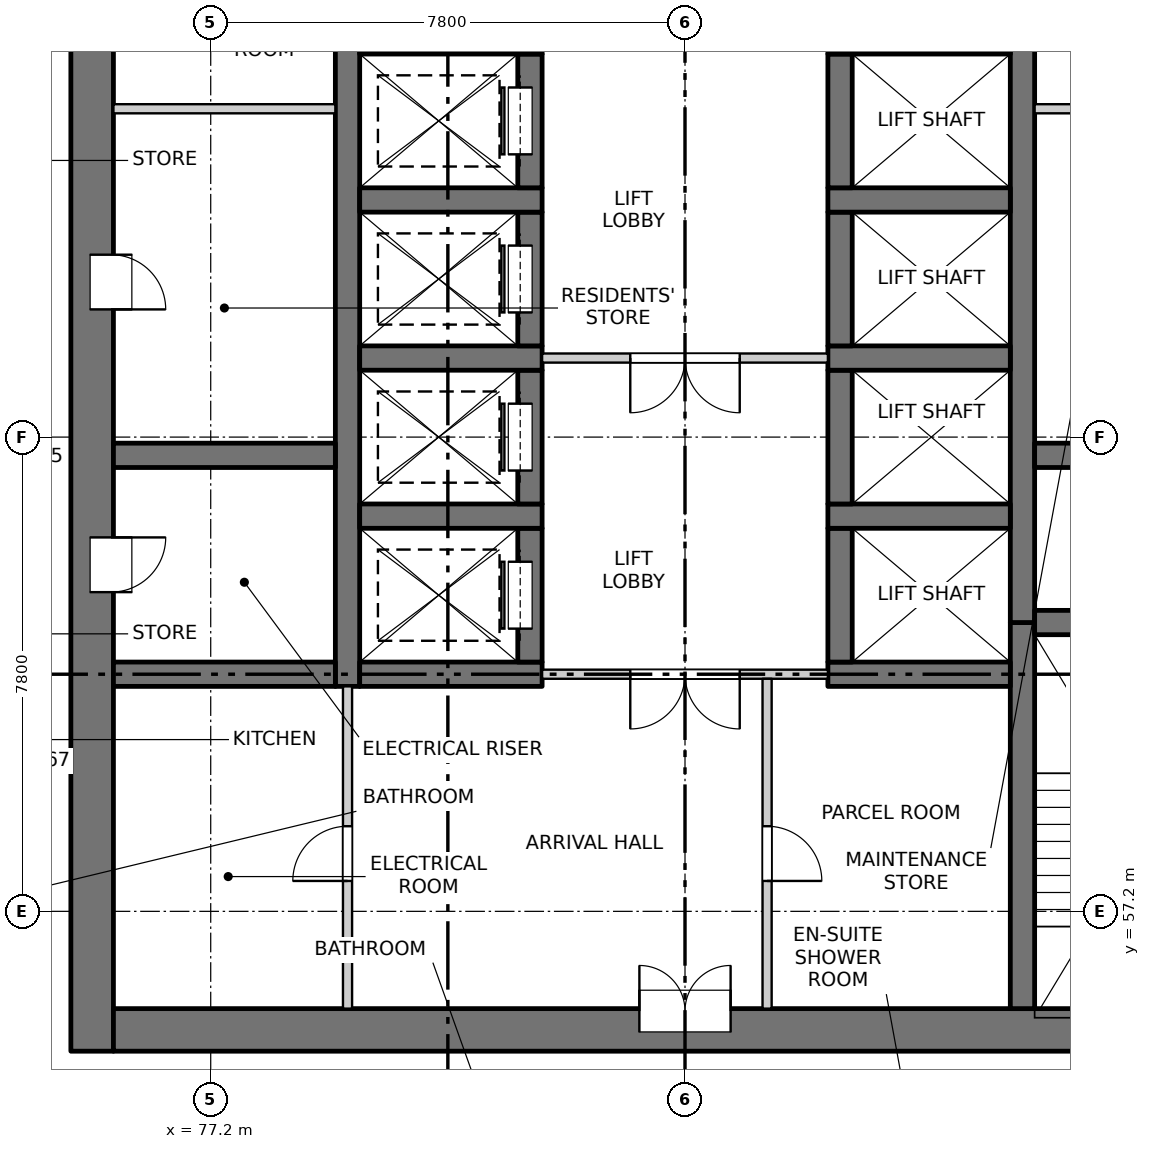
"""IFC4 building model, lengths in metres.
Left out: names, types, materials, properties, quantities, classifications, styles, units other than length and angle.
Written with IfcOpenShell. Run it as: python <this file> out.ifc"""

import sys

from ifc_helpers import new_model, si_unit, direction, frame, frame_2d, origin, place, context, subcontext, project, spatial, rectangle, extrude, element, fill, save


model = new_model("IFC4")
c1 = context("Model", 3, precision=1e-05, world=origin(), true_north=direction((0.0, 1.0)))
c2 = subcontext(c1, "Body", "Model", "MODEL_VIEW")
j1 = project(units=[si_unit("LENGTHUNIT", "METRE"), si_unit("PLANEANGLEUNIT", "RADIAN")], contexts=[c1])
p1 = place(None, origin())
s1 = spatial("IfcSite", under=j1, at=p1, CompositionType="ELEMENT")
p2 = place(p1, origin())
s2 = spatial("IfcBuilding", under=s1, at=p2, CompositionType="ELEMENT")
p3 = place(p2, frame((0.0, 0.0, 39.9)))
s3 = spatial("IfcBuildingStorey", under=s2, at=p3, CompositionType="ELEMENT", Elevation=39.9)
p4 = place(p3, frame((75.25, 54.9, -0.25), z_axis=(0.0, 0.0, 1.0), x_axis=(0.0, 1.0, 0.0)))
e1 = element("IfcWall", 1, at=p4, inside=s3, PredefinedType="SOLIDWALL", context=c2, shape_type="SweptSolid", body=[
    extrude(rectangle(XDim=22.4, YDim=0.7, at=frame_2d((11.2, 0.0))), origin(), (0.0, 0.0, 1.0), 3.4),
])
p5 = place(p4, frame((7.55, 0.0, 0.25)))
e2 = element("IfcOpeningElement", 2, at=p5, cuts=e1, PredefinedType="OPENING", context=c2, shape_type="SweptSolid", body=[
    extrude(rectangle(XDim=0.9, YDim=2.1, at=frame_2d((0.45, 1.05))), frame((0.0, 0.36, 0.0), z_axis=(0.0, -1.0, 0.0), x_axis=(1.0, 0.0, 0.0)), (0.0, 0.0, 1.0), 0.72),
])
p6 = place(p4, frame((12.2, 0.0, 0.25)))
e3 = element("IfcOpeningElement", 3, at=p6, cuts=e1, PredefinedType="OPENING", context=c2, shape_type="SweptSolid", body=[
    extrude(rectangle(XDim=0.9, YDim=2.1, at=frame_2d((0.45, 1.05))), frame((0.0, 0.36, 0.0), z_axis=(0.0, -1.0, 0.0), x_axis=(1.0, 0.0, 0.0)), (0.0, 0.0, 1.0), 0.72),
])
p7 = place(p4, frame((16.7, 0.0, 0.25)))
e4 = element("IfcOpeningElement", 4, at=p7, cuts=e1, PredefinedType="OPENING", context=c2, shape_type="SweptSolid", body=[
    extrude(rectangle(XDim=0.9, YDim=2.1, at=frame_2d((0.45, 1.05))), frame((0.0, 0.36, 0.0), z_axis=(0.0, -1.0, 0.0), x_axis=(1.0, 0.0, 0.0)), (0.0, 0.0, 1.0), 0.72),
])
p8 = place(p4, frame((20.15, 0.0, 0.25)))
e5 = element("IfcOpeningElement", 5, at=p8, cuts=e1, PredefinedType="OPENING", context=c2, shape_type="SweptSolid", body=[
    extrude(rectangle(XDim=0.9, YDim=2.1, at=frame_2d((0.45, 1.05))), frame((0.0, 0.36, 0.0), z_axis=(0.0, -1.0, 0.0), x_axis=(1.0, 0.0, 0.0)), (0.0, 0.0, 1.0), 0.72),
])
p9 = place(p3, frame((75.6, 55.25, -0.25), z_axis=(0.0, 0.0, 1.0), x_axis=(1.0, 0.0, 0.0)))
e6 = element("IfcWall", 6, at=p9, inside=s3, PredefinedType="SOLIDWALL", context=c2, shape_type="SweptSolid", body=[
    extrude(rectangle(XDim=18.8, YDim=0.7, at=frame_2d((9.4, 0.0))), origin(), (0.0, 0.0, 1.0), 3.4),
])
p10 = place(p9, frame((8.65, 0.0, 0.25)))
e7 = element("IfcOpeningElement", 7, at=p10, cuts=e6, PredefinedType="OPENING", context=c2, shape_type="SweptSolid", body=[
    extrude(rectangle(XDim=1.5, YDim=2.1, at=frame_2d((0.75, 1.05))), frame((0.0, 0.36, 0.0), z_axis=(0.0, -1.0, 0.0), x_axis=(1.0, 0.0, 0.0)), (0.0, 0.0, 1.0), 0.72),
])
p11 = place(p3, frame((79.45, 60.9, -0.25), z_axis=(0.0, 0.0, 1.0), x_axis=(0.0, 1.0, 0.0)))
e8 = element("IfcWall", 8, at=p11, inside=s3, PredefinedType="SOLIDWALL", context=c2, shape_type="SweptSolid", body=[
    extrude(rectangle(XDim=16.4, YDim=0.4, at=frame_2d((8.2, 0.0))), origin(), (0.0, 0.0, 1.0), 3.4),
])
p12 = place(p3, frame((90.55, 55.6, -0.25), z_axis=(0.0, 0.0, 1.0), x_axis=(0.0, 1.0, 0.0)))
e9 = element("IfcWall", 9, at=p12, inside=s3, PredefinedType="SOLIDWALL", context=c2, shape_type="SweptSolid", body=[
    extrude(rectangle(XDim=6.35, YDim=0.4, at=frame_2d((3.175, 0.0))), origin(), (0.0, 0.0, 1.0), 3.4),
])
p13 = place(p3, frame((90.55, 61.95, -0.25), z_axis=(0.0, 0.0, 1.0), x_axis=(0.0, 1.0, 0.0)))
e10 = element("IfcWall", 10, at=p13, inside=s3, PredefinedType="SOLIDWALL", context=c2, shape_type="SweptSolid", body=[
    extrude(rectangle(XDim=15.35, YDim=0.4, at=frame_2d((7.675, 0.0))), origin(), (0.0, 0.0, 1.0), 3.4),
])
p14 = place(p3, frame((79.65, 61.1, -0.25), z_axis=(0.0, 0.0, 1.0), x_axis=(1.0, 0.0, 0.0)))
e11 = element("IfcWall", 11, at=p14, inside=s3, PredefinedType="SOLIDWALL", context=c2, shape_type="SweptSolid", body=[
    extrude(rectangle(XDim=3.0, YDim=0.4, at=frame_2d((1.5, 0.0))), origin(), (0.0, 0.0, 1.0), 3.4),
])
p15 = place(p3, frame((82.45, 61.3, -0.25), z_axis=(0.0, 0.0, 1.0), x_axis=(0.0, 1.0, 0.0)))
e12 = element("IfcWall", 12, at=p15, inside=s3, PredefinedType="SOLIDWALL", context=c2, shape_type="SweptSolid", body=[
    extrude(rectangle(XDim=2.2, YDim=0.4, at=frame_2d((1.1, 0.0))), origin(), (0.0, 0.0, 1.0), 3.4),
])
p16 = place(p15, frame((0.55, 0.0, 0.25)))
e13 = element("IfcOpeningElement", 13, at=p16, cuts=e12, PredefinedType="OPENING", context=c2, shape_type="SweptSolid", body=[
    extrude(rectangle(XDim=1.1, YDim=2.1, at=frame_2d((0.55, 1.05))), frame((0.0, 0.21, 0.0), z_axis=(0.0, -1.0, 0.0), x_axis=(1.0, 0.0, 0.0)), (0.0, 0.0, 1.0), 0.42),
])
p17 = place(p3, frame((79.65, 63.7, -0.25), z_axis=(0.0, 0.0, 1.0), x_axis=(1.0, 0.0, 0.0)))
e14 = element("IfcWall", 14, at=p17, inside=s3, PredefinedType="SOLIDWALL", context=c2, shape_type="SweptSolid", body=[
    extrude(rectangle(XDim=3.0, YDim=0.4, at=frame_2d((1.5, 0.0))), origin(), (0.0, 0.0, 1.0), 3.4),
])
p18 = place(p3, frame((82.45, 63.9, -0.25), z_axis=(0.0, 0.0, 1.0), x_axis=(0.0, 1.0, 0.0)))
e15 = element("IfcWall", 15, at=p18, inside=s3, PredefinedType="SOLIDWALL", context=c2, shape_type="SweptSolid", body=[
    extrude(rectangle(XDim=2.2, YDim=0.4, at=frame_2d((1.1, 0.0))), origin(), (0.0, 0.0, 1.0), 3.4),
])
p19 = place(p18, frame((0.55, 0.0, 0.25)))
e16 = element("IfcOpeningElement", 16, at=p19, cuts=e15, PredefinedType="OPENING", context=c2, shape_type="SweptSolid", body=[
    extrude(rectangle(XDim=1.1, YDim=2.1, at=frame_2d((0.55, 1.05))), frame((0.0, 0.21, 0.0), z_axis=(0.0, -1.0, 0.0), x_axis=(1.0, 0.0, 0.0)), (0.0, 0.0, 1.0), 0.42),
])
p20 = place(p3, frame((79.65, 66.3, -0.25), z_axis=(0.0, 0.0, 1.0), x_axis=(1.0, 0.0, 0.0)))
e17 = element("IfcWall", 17, at=p20, inside=s3, PredefinedType="SOLIDWALL", context=c2, shape_type="SweptSolid", body=[
    extrude(rectangle(XDim=3.0, YDim=0.4, at=frame_2d((1.5, 0.0))), origin(), (0.0, 0.0, 1.0), 3.4),
])
p21 = place(p3, frame((82.45, 66.5, -0.25), z_axis=(0.0, 0.0, 1.0), x_axis=(0.0, 1.0, 0.0)))
e18 = element("IfcWall", 18, at=p21, inside=s3, PredefinedType="SOLIDWALL", context=c2, shape_type="SweptSolid", body=[
    extrude(rectangle(XDim=2.2, YDim=0.4, at=frame_2d((1.1, 0.0))), origin(), (0.0, 0.0, 1.0), 3.4),
])
p22 = place(p21, frame((0.55, 0.0, 0.25)))
e19 = element("IfcOpeningElement", 19, at=p22, cuts=e18, PredefinedType="OPENING", context=c2, shape_type="SweptSolid", body=[
    extrude(rectangle(XDim=1.1, YDim=2.1, at=frame_2d((0.55, 1.05))), frame((0.0, 0.21, 0.0), z_axis=(0.0, -1.0, 0.0), x_axis=(1.0, 0.0, 0.0)), (0.0, 0.0, 1.0), 0.42),
])
p23 = place(p3, frame((79.65, 68.9, -0.25), z_axis=(0.0, 0.0, 1.0), x_axis=(1.0, 0.0, 0.0)))
e20 = element("IfcWall", 20, at=p23, inside=s3, PredefinedType="SOLIDWALL", context=c2, shape_type="SweptSolid", body=[
    extrude(rectangle(XDim=3.0, YDim=0.4, at=frame_2d((1.5, 0.0))), origin(), (0.0, 0.0, 1.0), 3.4),
])
p24 = place(p3, frame((82.45, 69.1, -0.25), z_axis=(0.0, 0.0, 1.0), x_axis=(0.0, 1.0, 0.0)))
e21 = element("IfcWall", 21, at=p24, inside=s3, PredefinedType="SOLIDWALL", context=c2, shape_type="SweptSolid", body=[
    extrude(rectangle(XDim=2.2, YDim=0.4, at=frame_2d((1.1, 0.0))), origin(), (0.0, 0.0, 1.0), 3.4),
])
p25 = place(p24, frame((0.55, 0.0, 0.25)))
e22 = element("IfcOpeningElement", 22, at=p25, cuts=e21, PredefinedType="OPENING", context=c2, shape_type="SweptSolid", body=[
    extrude(rectangle(XDim=1.1, YDim=2.1, at=frame_2d((0.55, 1.05))), frame((0.0, 0.21, 0.0), z_axis=(0.0, -1.0, 0.0), x_axis=(1.0, 0.0, 0.0)), (0.0, 0.0, 1.0), 0.42),
])
for number, where, z_axis, x_axis in (
    (23, (79.65, 71.5, -0.25), (0.0, 0.0, 1.0), (1.0, 0.0, 0.0)),
    (24, (87.35, 61.1, -0.25), (0.0, 0.0, 1.0), (1.0, 0.0, 0.0)),
):
    element("IfcWall", number, at=place(p3, frame(where, z_axis=z_axis, x_axis=x_axis)), inside=s3, PredefinedType="SOLIDWALL", context=c2, shape_type="SweptSolid", body=[
        extrude(rectangle(XDim=3.0, YDim=0.4, at=frame_2d((1.5, 0.0))), origin(), (0.0, 0.0, 1.0), 3.4),
    ])
p26 = place(p3, frame((87.55, 61.3, -0.25), z_axis=(0.0, 0.0, 1.0), x_axis=(0.0, 1.0, 0.0)))
e25 = element("IfcWall", 25, at=p26, inside=s3, PredefinedType="SOLIDWALL", context=c2, shape_type="SweptSolid", body=[
    extrude(rectangle(XDim=2.2, YDim=0.4, at=frame_2d((1.1, 0.0))), origin(), (0.0, 0.0, 1.0), 3.4),
])
p27 = place(p3, frame((87.35, 63.7, -0.25), z_axis=(0.0, 0.0, 1.0), x_axis=(1.0, 0.0, 0.0)))
e26 = element("IfcWall", 26, at=p27, inside=s3, PredefinedType="SOLIDWALL", context=c2, shape_type="SweptSolid", body=[
    extrude(rectangle(XDim=3.0, YDim=0.4, at=frame_2d((1.5, 0.0))), origin(), (0.0, 0.0, 1.0), 3.4),
])
p28 = place(p3, frame((87.55, 63.9, -0.25), z_axis=(0.0, 0.0, 1.0), x_axis=(0.0, 1.0, 0.0)))
e27 = element("IfcWall", 27, at=p28, inside=s3, PredefinedType="SOLIDWALL", context=c2, shape_type="SweptSolid", body=[
    extrude(rectangle(XDim=2.2, YDim=0.4, at=frame_2d((1.1, 0.0))), origin(), (0.0, 0.0, 1.0), 3.4),
])
p29 = place(p3, frame((87.35, 66.3, -0.25), z_axis=(0.0, 0.0, 1.0), x_axis=(1.0, 0.0, 0.0)))
e28 = element("IfcWall", 28, at=p29, inside=s3, PredefinedType="SOLIDWALL", context=c2, shape_type="SweptSolid", body=[
    extrude(rectangle(XDim=3.0, YDim=0.4, at=frame_2d((1.5, 0.0))), origin(), (0.0, 0.0, 1.0), 3.4),
])
p30 = place(p3, frame((87.55, 66.5, -0.25), z_axis=(0.0, 0.0, 1.0), x_axis=(0.0, 1.0, 0.0)))
e29 = element("IfcWall", 29, at=p30, inside=s3, PredefinedType="SOLIDWALL", context=c2, shape_type="SweptSolid", body=[
    extrude(rectangle(XDim=2.2, YDim=0.4, at=frame_2d((1.1, 0.0))), origin(), (0.0, 0.0, 1.0), 3.4),
])
p31 = place(p3, frame((87.35, 68.9, -0.25), z_axis=(0.0, 0.0, 1.0), x_axis=(1.0, 0.0, 0.0)))
e30 = element("IfcWall", 30, at=p31, inside=s3, PredefinedType="SOLIDWALL", context=c2, shape_type="SweptSolid", body=[
    extrude(rectangle(XDim=3.0, YDim=0.4, at=frame_2d((1.5, 0.0))), origin(), (0.0, 0.0, 1.0), 3.4),
])
p32 = place(p3, frame((87.55, 69.1, -0.25), z_axis=(0.0, 0.0, 1.0), x_axis=(0.0, 1.0, 0.0)))
e31 = element("IfcWall", 31, at=p32, inside=s3, PredefinedType="SOLIDWALL", context=c2, shape_type="SweptSolid", body=[
    extrude(rectangle(XDim=2.2, YDim=0.4, at=frame_2d((1.1, 0.0))), origin(), (0.0, 0.0, 1.0), 3.4),
])
p33 = place(p3, frame((87.35, 71.5, -0.25), z_axis=(0.0, 0.0, 1.0), x_axis=(1.0, 0.0, 0.0)))
e32 = element("IfcWall", 32, at=p33, inside=s3, PredefinedType="SOLIDWALL", context=c2, shape_type="SweptSolid", body=[
    extrude(rectangle(XDim=3.0, YDim=0.4, at=frame_2d((1.5, 0.0))), origin(), (0.0, 0.0, 1.0), 3.4),
])
for number, where, z_axis, x_axis in (
    (33, (75.6, 61.1, -0.25), (0.0, 0.0, 1.0), (1.0, 0.0, 0.0)),
    (34, (75.6, 64.7, -0.25), (0.0, 0.0, 1.0), (1.0, 0.0, 0.0)),
    (35, (90.75, 61.95, -0.25), (0.0, 0.0, 1.0), (1.0, 0.0, 0.0)),
    (36, (90.75, 64.7, -0.25), (0.0, 0.0, 1.0), (1.0, 0.0, 0.0)),
):
    element("IfcWall", number, at=place(p3, frame(where, z_axis=z_axis, x_axis=x_axis)), inside=s3, PredefinedType="SOLIDWALL", context=c2, shape_type="SweptSolid", body=[
        extrude(rectangle(XDim=3.65, YDim=0.4, at=frame_2d((1.825, 0.0))), origin(), (0.0, 0.0, 1.0), 3.4),
    ])
p34 = place(p3, frame((82.65, 61.1, 0.0), z_axis=(0.0, 0.0, 1.0), x_axis=(1.0, 0.0, 0.0)))
e37 = element("IfcWall", 37, at=p34, inside=s3, PredefinedType="PARTITIONING", context=c2, shape_type="SweptSolid", body=[
    extrude(rectangle(XDim=4.7, YDim=0.15, at=frame_2d((2.35, 0.0))), origin(), (0.0, 0.0, 1.0), 3.15),
])
p35 = place(p34, frame((1.45, 0.0, 0.0)))
e38 = element("IfcOpeningElement", 38, at=p35, cuts=e37, PredefinedType="OPENING", context=c2, shape_type="SweptSolid", body=[
    extrude(rectangle(XDim=1.8, YDim=2.1, at=frame_2d((0.9, 1.05))), frame((0.0, 0.085, 0.0), z_axis=(0.0, -1.0, 0.0), x_axis=(1.0, 0.0, 0.0)), (0.0, 0.0, 1.0), 0.17),
])
p36 = place(p3, frame((82.65, 66.3, 0.0), z_axis=(0.0, 0.0, 1.0), x_axis=(1.0, 0.0, 0.0)))
e39 = element("IfcWall", 39, at=p36, inside=s3, PredefinedType="PARTITIONING", context=c2, shape_type="SweptSolid", body=[
    extrude(rectangle(XDim=4.7, YDim=0.15, at=frame_2d((2.35, 0.0))), origin(), (0.0, 0.0, 1.0), 3.15),
])
p37 = place(p36, frame((1.45, 0.0, 0.0)))
e40 = element("IfcOpeningElement", 40, at=p37, cuts=e39, PredefinedType="OPENING", context=c2, shape_type="SweptSolid", body=[
    extrude(rectangle(XDim=1.8, YDim=2.1, at=frame_2d((0.9, 1.05))), frame((0.0, 0.085, 0.0), z_axis=(0.0, -1.0, 0.0), x_axis=(1.0, 0.0, 0.0)), (0.0, 0.0, 1.0), 0.17),
])
p38 = place(p3, frame((75.6, 70.4, 0.0), z_axis=(0.0, 0.0, 1.0), x_axis=(1.0, 0.0, 0.0)))
e41 = element("IfcWall", 41, at=p38, inside=s3, PredefinedType="PARTITIONING", context=c2, shape_type="SweptSolid", body=[
    extrude(rectangle(XDim=3.65, YDim=0.15, at=frame_2d((1.825, 0.0))), origin(), (0.0, 0.0, 1.0), 3.15),
])
p39 = place(p3, frame((90.75, 70.4, 0.0), z_axis=(0.0, 0.0, 1.0), x_axis=(1.0, 0.0, 0.0)))
e42 = element("IfcWall", 42, at=p39, inside=s3, PredefinedType="PARTITIONING", context=c2, shape_type="SweptSolid", body=[
    extrude(rectangle(XDim=3.65, YDim=0.15, at=frame_2d((1.825, 0.0))), origin(), (0.0, 0.0, 1.0), 3.15),
])
p40 = place(p3, frame((79.45, 55.6, 0.0), z_axis=(0.0, 0.0, 1.0), x_axis=(0.0, 1.0, 0.0)))
e43 = element("IfcWall", 43, at=p40, inside=s3, PredefinedType="PARTITIONING", context=c2, shape_type="SweptSolid", body=[
    extrude(rectangle(XDim=5.3, YDim=0.15, at=frame_2d((2.65, 0.0))), origin(), (0.0, 0.0, 1.0), 3.15),
])
p41 = place(p40, frame((2.1, 0.0, 0.0)))
e44 = element("IfcOpeningElement", 44, at=p41, cuts=e43, PredefinedType="OPENING", context=c2, shape_type="SweptSolid", body=[
    extrude(rectangle(XDim=0.9, YDim=2.1, at=frame_2d((0.45, 1.05))), frame((0.0, 0.085, 0.0), z_axis=(0.0, -1.0, 0.0), x_axis=(1.0, 0.0, 0.0)), (0.0, 0.0, 1.0), 0.17),
])
p42 = place(p3, frame((86.35, 55.6, 0.0), z_axis=(0.0, 0.0, 1.0), x_axis=(0.0, 1.0, 0.0)))
e45 = element("IfcWall", 45, at=p42, inside=s3, PredefinedType="PARTITIONING", context=c2, shape_type="SweptSolid", body=[
    extrude(rectangle(XDim=5.425, YDim=0.15, at=frame_2d((2.712, 0.0))), origin(), (0.0, 0.0, 1.0), 3.15),
])
p43 = place(p42, frame((2.1, 0.0, 0.0)))
e46 = element("IfcOpeningElement", 46, at=p43, cuts=e45, PredefinedType="OPENING", context=c2, shape_type="SweptSolid", body=[
    extrude(rectangle(XDim=0.9, YDim=2.1, at=frame_2d((0.45, 1.05))), frame((0.0, 0.085, 0.0), z_axis=(0.0, -1.0, 0.0), x_axis=(1.0, 0.0, 0.0)), (0.0, 0.0, 1.0), 0.17),
])
p44 = place(p10, origin())
e47 = element("IfcDoor", 47, at=p44, inside=s3, OperationType="DOUBLE_DOOR_SINGLE_SWING", PredefinedType="DOOR", context=c2, shape_type="SweptSolid", body=[
    extrude(rectangle(XDim=1.5, YDim=2.1, at=frame_2d((0.75, 1.05))), frame((0.0, 0.335, 0.0), z_axis=(0.0, -1.0, 0.0), x_axis=(1.0, 0.0, 0.0)), (0.0, 0.0, 1.0), 0.05),
])
fill(e7, e47)
p45 = place(p41, origin())
e48 = element("IfcDoor", 48, at=p45, inside=s3, OperationType="SINGLE_SWING_LEFT", PredefinedType="DOOR", context=c2, shape_type="SweptSolid", body=[
    extrude(rectangle(XDim=0.9, YDim=2.1, at=frame_2d((0.45, 1.05))), frame((0.0, 0.025, 0.0), z_axis=(0.0, -1.0, 0.0), x_axis=(1.0, 0.0, 0.0)), (0.0, 0.0, 1.0), 0.05),
])
fill(e44, e48)
p46 = place(p43, origin())
e49 = element("IfcDoor", 49, at=p46, inside=s3, OperationType="SINGLE_SWING_RIGHT", PredefinedType="DOOR", context=c2, shape_type="SweptSolid", body=[
    extrude(rectangle(XDim=0.9, YDim=2.1, at=frame_2d((0.45, 1.05))), frame((0.0, 0.025, 0.0), z_axis=(0.0, -1.0, 0.0), x_axis=(1.0, 0.0, 0.0)), (0.0, 0.0, 1.0), 0.05),
])
fill(e46, e49)
p47 = place(p35, origin())
e50 = element("IfcDoor", 50, at=p47, inside=s3, OperationType="DOUBLE_DOOR_SINGLE_SWING", PredefinedType="DOOR", context=c2, shape_type="SweptSolid", body=[
    extrude(rectangle(XDim=1.8, YDim=2.1, at=frame_2d((0.9, 1.05))), frame((0.0, 0.025, 0.0), z_axis=(0.0, -1.0, 0.0), x_axis=(1.0, 0.0, 0.0)), (0.0, 0.0, 1.0), 0.05),
])
fill(e38, e50)
p48 = place(p16, origin())
e51 = element("IfcDoor", 51, at=p48, inside=s3, OperationType="SLIDING_TO_RIGHT", PredefinedType="DOOR", context=c2, shape_type="SweptSolid", body=[
    extrude(rectangle(XDim=1.1, YDim=2.1, at=frame_2d((0.55, 1.05))), frame((0.0, 0.185, 0.0), z_axis=(0.0, -1.0, 0.0), x_axis=(1.0, 0.0, 0.0)), (0.0, 0.0, 1.0), 0.05),
])
fill(e13, e51)
p49 = place(p5, origin())
e52 = element("IfcDoor", 52, at=p49, inside=s3, OperationType="SINGLE_SWING_LEFT", PredefinedType="DOOR", context=c2, shape_type="SweptSolid", body=[
    extrude(rectangle(XDim=0.9, YDim=2.1, at=frame_2d((0.45, 1.05))), frame((0.0, -0.285, 0.0), z_axis=(0.0, -1.0, 0.0), x_axis=(1.0, 0.0, 0.0)), (0.0, 0.0, 1.0), 0.05),
])
fill(e2, e52)
p50 = place(p19, origin())
e53 = element("IfcDoor", 53, at=p50, inside=s3, OperationType="SLIDING_TO_RIGHT", PredefinedType="DOOR", context=c2, shape_type="SweptSolid", body=[
    extrude(rectangle(XDim=1.1, YDim=2.1, at=frame_2d((0.55, 1.05))), frame((0.0, 0.185, 0.0), z_axis=(0.0, -1.0, 0.0), x_axis=(1.0, 0.0, 0.0)), (0.0, 0.0, 1.0), 0.05),
])
fill(e16, e53)
p51 = place(p37, origin())
e54 = element("IfcDoor", 54, at=p51, inside=s3, OperationType="DOUBLE_DOOR_SINGLE_SWING", PredefinedType="DOOR", context=c2, shape_type="SweptSolid", body=[
    extrude(rectangle(XDim=1.8, YDim=2.1, at=frame_2d((0.9, 1.05))), frame((0.0, 0.025, 0.0), z_axis=(0.0, -1.0, 0.0), x_axis=(1.0, 0.0, 0.0)), (0.0, 0.0, 1.0), 0.05),
])
fill(e40, e54)
p52 = place(p6, origin())
e55 = element("IfcDoor", 55, at=p52, inside=s3, OperationType="SINGLE_SWING_RIGHT", PredefinedType="DOOR", context=c2, shape_type="SweptSolid", body=[
    extrude(rectangle(XDim=0.9, YDim=2.1, at=frame_2d((0.45, 1.05))), frame((0.0, -0.285, 0.0), z_axis=(0.0, -1.0, 0.0), x_axis=(1.0, 0.0, 0.0)), (0.0, 0.0, 1.0), 0.05),
])
fill(e3, e55)
p53 = place(p22, origin())
e56 = element("IfcDoor", 56, at=p53, inside=s3, OperationType="SLIDING_TO_RIGHT", PredefinedType="DOOR", context=c2, shape_type="SweptSolid", body=[
    extrude(rectangle(XDim=1.1, YDim=2.1, at=frame_2d((0.55, 1.05))), frame((0.0, 0.185, 0.0), z_axis=(0.0, -1.0, 0.0), x_axis=(1.0, 0.0, 0.0)), (0.0, 0.0, 1.0), 0.05),
])
fill(e19, e56)
p54 = place(p25, origin())
e57 = element("IfcDoor", 57, at=p54, inside=s3, OperationType="SLIDING_TO_LEFT", PredefinedType="DOOR", context=c2, shape_type="SweptSolid", body=[
    extrude(rectangle(XDim=1.1, YDim=2.1, at=frame_2d((0.55, 1.05))), frame((0.0, 0.185, 0.0), z_axis=(0.0, -1.0, 0.0), x_axis=(1.0, 0.0, 0.0)), (0.0, 0.0, 1.0), 0.05),
])
fill(e22, e57)
save(model, sys.argv[1])
